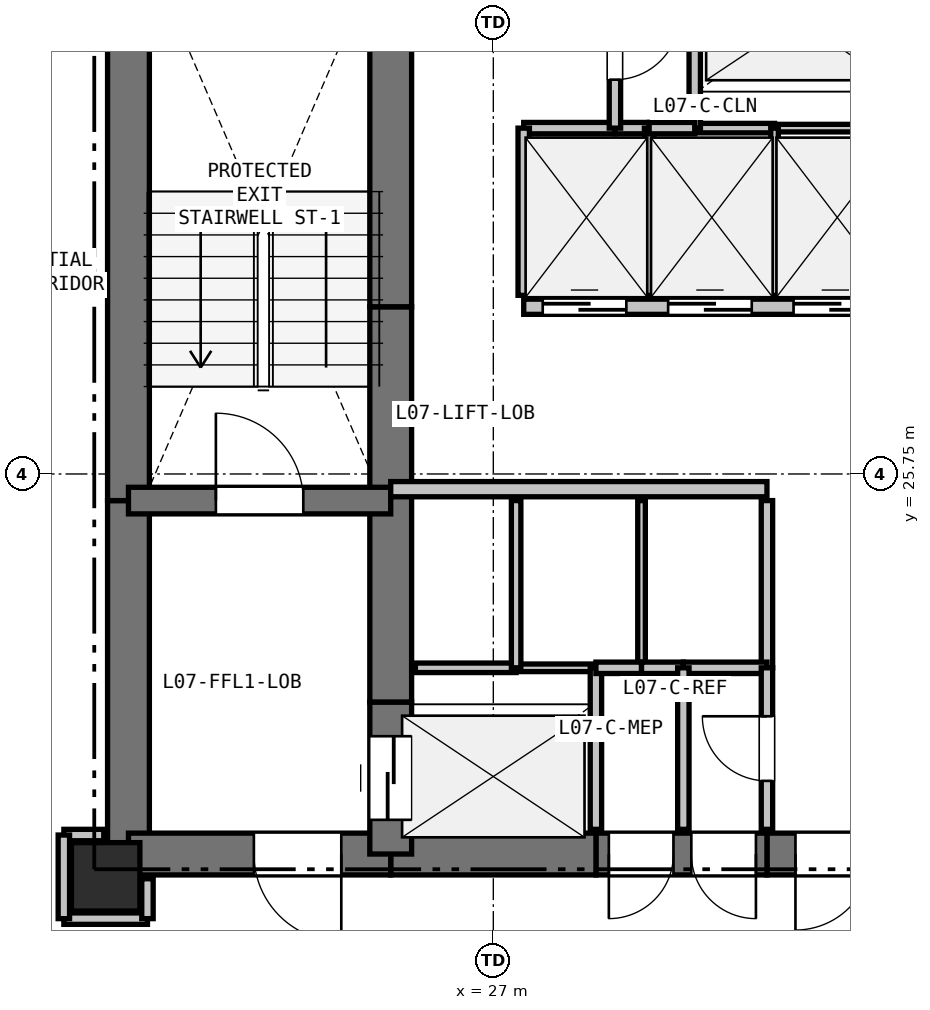
"""IFC4 building model, lengths in metres.
Left out: names, types, materials, properties, quantities, classifications, styles, units other than length and angle.
Written with IfcOpenShell. Run it as: python <this file> out.ifc"""

import sys

from ifc_helpers import new_model, si_unit, direction, frame, frame_2d, origin, origin_2d, place, context, subcontext, project, spatial, rectangle, extrude, element, fill, save


model = new_model("IFC4")
c1 = context("Model", 3, precision=1e-05, world=origin(), true_north=direction((0.0, 1.0)))
c2 = subcontext(c1, "Body", "Model", "MODEL_VIEW")
j1 = project(units=[si_unit("LENGTHUNIT", "METRE"), si_unit("PLANEANGLEUNIT", "RADIAN")], contexts=[c1])
p1 = place(None, origin())
s1 = spatial("IfcSite", under=j1, at=p1, CompositionType="ELEMENT")
p2 = place(p1, origin())
s2 = spatial("IfcBuilding", under=s1, at=p2, CompositionType="ELEMENT")
p3 = place(p2, frame((0.0, 0.0, 29.1)))
s3 = spatial("IfcBuildingStorey", under=s2, at=p3, CompositionType="ELEMENT", Elevation=29.1)
p4 = place(p3, frame((21.9, 20.45, 0.0), z_axis=(0.0, 0.0, 1.0), x_axis=(1.0, 0.0, 0.0)))
e1 = element("IfcColumn", 1, at=p4, inside=s3, PredefinedType="COLUMN", context=c2, shape_type="SweptSolid", body=[
    extrude(rectangle(XDim=0.9, YDim=0.9, at=origin_2d()), origin(), (0.0, 0.0, 1.0), 3.3),
])
p5 = place(p3, frame((22.2, 20.75, 0.0), z_axis=(0.0, 0.0, 1.0), x_axis=(0.0, 1.0, 0.0)))
e2 = element("IfcWall", 2, at=p5, inside=s3, PredefinedType="SHEAR", context=c2, shape_type="SweptSolid", body=[
    extrude(rectangle(XDim=4.65, YDim=0.55, at=frame_2d((2.325, 0.0))), origin(), (0.0, 0.0, 1.0), 3.04),
])
p6 = place(p3, frame((22.2, 25.4, 0.0), z_axis=(0.0, 0.0, 1.0), x_axis=(0.0, 1.0, 0.0)))
e3 = element("IfcWall", 3, at=p6, inside=s3, PredefinedType="SHEAR", context=c2, shape_type="SweptSolid", body=[
    extrude(rectangle(XDim=7.35, YDim=0.55, at=frame_2d((3.675, 0.0))), origin(), (0.0, 0.0, 1.0), 3.04),
])
p7 = place(p3, frame((32.35, 20.75, 0.0), z_axis=(0.0, 0.0, 1.0), x_axis=(-1.0, 0.0, 0.0)))
e4 = element("IfcWall", 4, at=p7, inside=s3, PredefinedType="SHEAR", context=c2, shape_type="SweptSolid", body=[
    extrude(rectangle(XDim=1.75, YDim=0.55, at=frame_2d((0.875, 0.0))), origin(), (0.0, 0.0, 1.0), 3.04),
])
p8 = place(p7, frame((0.375, 0.0, 0.0)))
e5 = element("IfcOpeningElement", 5, at=p8, cuts=e4, PredefinedType="OPENING", context=c2, shape_type="SweptSolid", body=[
    extrude(rectangle(XDim=1.0, YDim=2.15, at=frame_2d((0.5, 1.075))), frame((0.0, 0.285, 0.0), z_axis=(0.0, -1.0, 0.0), x_axis=(1.0, 0.0, 0.0)), (0.0, 0.0, 1.0), 0.57),
])
p9 = place(p3, frame((30.6, 20.75, 0.0), z_axis=(0.0, 0.0, 1.0), x_axis=(-1.0, 0.0, 0.0)))
e6 = element("IfcWall", 6, at=p9, inside=s3, PredefinedType="SHEAR", context=c2, shape_type="SweptSolid", body=[
    extrude(rectangle(XDim=2.25, YDim=0.55, at=frame_2d((1.125, 0.0))), origin(), (0.0, 0.0, 1.0), 3.04),
])
p10 = place(p9, frame((1.23, 0.0, 0.0)))
e7 = element("IfcOpeningElement", 7, at=p10, cuts=e6, PredefinedType="OPENING", context=c2, shape_type="SweptSolid", body=[
    extrude(rectangle(XDim=0.85, YDim=2.1, at=frame_2d((0.425, 1.05))), frame((0.0, 0.285, 0.0), z_axis=(0.0, -1.0, 0.0), x_axis=(1.0, 0.0, 0.0)), (0.0, 0.0, 1.0), 0.57),
])
p11 = place(p9, frame((0.145, 0.0, 0.0)))
e8 = element("IfcOpeningElement", 8, at=p11, cuts=e6, PredefinedType="OPENING", context=c2, shape_type="SweptSolid", body=[
    extrude(rectangle(XDim=0.85, YDim=2.1, at=frame_2d((0.425, 1.05))), frame((0.0, 0.285, 0.0), z_axis=(0.0, -1.0, 0.0), x_axis=(1.0, 0.0, 0.0)), (0.0, 0.0, 1.0), 0.57),
])
p12 = place(p3, frame((28.35, 20.75, 0.0), z_axis=(0.0, 0.0, 1.0), x_axis=(-1.0, 0.0, 0.0)))
e9 = element("IfcWall", 9, at=p12, inside=s3, PredefinedType="SHEAR", context=c2, shape_type="SweptSolid", body=[
    extrude(rectangle(XDim=2.7, YDim=0.55, at=frame_2d((1.35, 0.0))), origin(), (0.0, 0.0, 1.0), 3.04),
])
p13 = place(p3, frame((25.65, 20.75, 0.0), z_axis=(0.0, 0.0, 1.0), x_axis=(-1.0, 0.0, 0.0)))
e10 = element("IfcWall", 10, at=p13, inside=s3, PredefinedType="SHEAR", context=c2, shape_type="SweptSolid", body=[
    extrude(rectangle(XDim=3.45, YDim=0.55, at=frame_2d((1.725, 0.0))), origin(), (0.0, 0.0, 1.0), 3.04),
])
p14 = place(p13, frame((0.65, 0.0, 0.0)))
e11 = element("IfcOpeningElement", 11, at=p14, cuts=e10, PredefinedType="OPENING", context=c2, shape_type="SweptSolid", body=[
    extrude(rectangle(XDim=1.15, YDim=2.15, at=frame_2d((0.575, 1.075))), frame((0.0, 0.285, 0.0), z_axis=(0.0, -1.0, 0.0), x_axis=(1.0, 0.0, 0.0)), (0.0, 0.0, 1.0), 0.57),
])
p15 = place(p3, frame((25.65, 20.75, 0.0), z_axis=(0.0, 0.0, 1.0), x_axis=(0.0, 1.0, 0.0)))
e12 = element("IfcWall", 12, at=p15, inside=s3, PredefinedType="SHEAR", context=c2, shape_type="SweptSolid", body=[
    extrude(rectangle(XDim=2.0, YDim=0.55, at=frame_2d((1.0, 0.0))), origin(), (0.0, 0.0, 1.0), 3.04),
])
p16 = place(p15, frame((0.45, 0.0, 0.0)))
e13 = element("IfcOpeningElement", 13, at=p16, cuts=e12, PredefinedType="OPENING", context=c2, shape_type="SweptSolid", body=[
    extrude(rectangle(XDim=1.1, YDim=2.15, at=frame_2d((0.55, 1.075))), frame((0.0, 0.285, 0.0), z_axis=(0.0, -1.0, 0.0), x_axis=(1.0, 0.0, 0.0)), (0.0, 0.0, 1.0), 0.57),
])
p17 = place(p3, frame((25.65, 22.75, 0.0), z_axis=(0.0, 0.0, 1.0), x_axis=(0.0, 1.0, 0.0)))
e14 = element("IfcWall", 14, at=p17, inside=s3, PredefinedType="SHEAR", context=c2, shape_type="SweptSolid", body=[
    extrude(rectangle(XDim=2.8, YDim=0.55, at=frame_2d((1.4, 0.0))), origin(), (0.0, 0.0, 1.0), 3.04),
])
p18 = place(p3, frame((25.65, 25.55, 0.0), z_axis=(0.0, 0.0, 1.0), x_axis=(0.0, 1.0, 0.0)))
e15 = element("IfcWall", 15, at=p18, inside=s3, PredefinedType="SHEAR", context=c2, shape_type="SweptSolid", body=[
    extrude(rectangle(XDim=2.4, YDim=0.55, at=frame_2d((1.2, 0.0))), origin(), (0.0, 0.0, 1.0), 3.04),
])
p19 = place(p3, frame((25.65, 27.95, 0.0), z_axis=(0.0, 0.0, 1.0), x_axis=(0.0, 1.0, 0.0)))
e16 = element("IfcWall", 16, at=p19, inside=s3, PredefinedType="SHEAR", context=c2, shape_type="SweptSolid", body=[
    extrude(rectangle(XDim=4.8, YDim=0.55, at=frame_2d((2.4, 0.0))), origin(), (0.0, 0.0, 1.0), 3.04),
])
p20 = place(p3, frame((22.2, 25.4, 0.0), z_axis=(0.0, 0.0, 1.0), x_axis=(1.0, 0.0, 0.0)))
e17 = element("IfcWall", 17, at=p20, inside=s3, PredefinedType="SHEAR", context=c2, shape_type="SweptSolid", body=[
    extrude(rectangle(XDim=3.45, YDim=0.35, at=frame_2d((1.725, 0.0))), origin(), (0.0, 0.0, 1.0), 3.04),
])
p21 = place(p20, frame((1.15, 0.0, 0.0)))
e18 = element("IfcOpeningElement", 18, at=p21, cuts=e17, PredefinedType="OPENING", context=c2, shape_type="SweptSolid", body=[
    extrude(rectangle(XDim=1.15, YDim=2.15, at=frame_2d((0.575, 1.075))), frame((0.0, 0.185, 0.0), z_axis=(0.0, -1.0, 0.0), x_axis=(1.0, 0.0, 0.0)), (0.0, 0.0, 1.0), 0.37),
])
p22 = place(p3, frame((25.65, 25.55, 0.0), z_axis=(0.0, 0.0, 1.0), x_axis=(1.0, 0.0, 0.0)))
e19 = element("IfcWall", 19, at=p22, inside=s3, PredefinedType="PARTITIONING", context=c2, shape_type="SweptSolid", body=[
    extrude(rectangle(XDim=4.95, YDim=0.2, at=frame_2d((2.475, 0.0))), origin(), (0.0, 0.0, 1.0), 3.04),
])
p23 = place(p3, frame((27.4, 27.95, 0.0), z_axis=(0.0, 0.0, 1.0), x_axis=(1.0, 0.0, 0.0)))
e20 = element("IfcWall", 20, at=p23, inside=s3, PredefinedType="PARTITIONING", context=c2, shape_type="SweptSolid", body=[
    extrude(rectangle(XDim=4.95, YDim=0.2, at=frame_2d((2.475, 0.0))), origin(), (0.0, 0.0, 1.0), 3.04),
])
p24 = place(p23, frame((0.25, 0.0, 0.0)))
e21 = element("IfcOpeningElement", 21, at=p24, cuts=e20, PredefinedType="OPENING", context=c2, shape_type="SweptSolid", body=[
    extrude(rectangle(XDim=1.1, YDim=2.15, at=frame_2d((0.55, 1.075))), frame((0.0, 0.11, 0.0), z_axis=(0.0, -1.0, 0.0), x_axis=(1.0, 0.0, 0.0)), (0.0, 0.0, 1.0), 0.22),
])
p25 = place(p23, frame((1.9, 0.0, 0.0)))
e22 = element("IfcOpeningElement", 22, at=p25, cuts=e20, PredefinedType="OPENING", context=c2, shape_type="SweptSolid", body=[
    extrude(rectangle(XDim=1.1, YDim=2.15, at=frame_2d((0.55, 1.075))), frame((0.0, 0.11, 0.0), z_axis=(0.0, -1.0, 0.0), x_axis=(1.0, 0.0, 0.0)), (0.0, 0.0, 1.0), 0.22),
])
p26 = place(p23, frame((3.55, 0.0, 0.0)))
e23 = element("IfcOpeningElement", 23, at=p26, cuts=e20, PredefinedType="OPENING", context=c2, shape_type="SweptSolid", body=[
    extrude(rectangle(XDim=1.1, YDim=2.15, at=frame_2d((0.55, 1.075))), frame((0.0, 0.11, 0.0), z_axis=(0.0, -1.0, 0.0), x_axis=(1.0, 0.0, 0.0)), (0.0, 0.0, 1.0), 0.22),
])
p27 = place(p3, frame((25.975, 23.2, 0.0), z_axis=(0.0, 0.0, 1.0), x_axis=(1.0, 0.0, 0.0)))
e24 = element("IfcWall", 24, at=p27, inside=s3, PredefinedType="PARTITIONING", context=c2, shape_type="SweptSolid", body=[
    extrude(rectangle(XDim=1.325, YDim=0.125, at=frame_2d((0.663, 0.0))), origin(), (0.0, 0.0, 1.0), 3.04),
])
p28 = place(p3, frame((27.3, 23.2, 0.0), z_axis=(0.0, 0.0, 1.0), x_axis=(1.0, 0.0, 0.0)))
e25 = element("IfcWall", 25, at=p28, inside=s3, PredefinedType="PARTITIONING", context=c2, shape_type="SweptSolid", body=[
    extrude(rectangle(XDim=1.05, YDim=0.1, at=frame_2d((0.525, 0.0))), origin(), (0.0, 0.0, 1.0), 3.04),
])
p29 = place(p3, frame((28.35, 23.2, 0.0), z_axis=(0.0, 0.0, 1.0), x_axis=(0.0, -1.0, 0.0)))
e26 = element("IfcWall", 26, at=p29, inside=s3, PredefinedType="PARTITIONING", context=c2, shape_type="SweptSolid", body=[
    extrude(rectangle(XDim=2.125, YDim=0.15, at=frame_2d((1.062, 0.0))), origin(), (0.0, 0.0, 1.0), 3.04),
])
p30 = place(p3, frame((32.025, 30.3, 0.0), z_axis=(0.0, 0.0, 1.0), x_axis=(-1.0, 0.0, 0.0)))
e27 = element("IfcWall", 27, at=p30, inside=s3, PredefinedType="PARTITIONING", context=c2, shape_type="SweptSolid", body=[
    extrude(rectangle(XDim=1.325, YDim=0.1, at=frame_2d((0.663, 0.0))), origin(), (0.0, 0.0, 1.0), 3.04),
])
p31 = place(p3, frame((30.7, 30.3, 0.0), z_axis=(0.0, 0.0, 1.0), x_axis=(-1.0, 0.0, 0.0)))
e28 = element("IfcWall", 28, at=p31, inside=s3, PredefinedType="PARTITIONING", context=c2, shape_type="SweptSolid", body=[
    extrude(rectangle(XDim=1.05, YDim=0.125, at=frame_2d((0.525, 0.0))), origin(), (0.0, 0.0, 1.0), 3.04),
])
p32 = place(p3, frame((29.65, 30.3, 0.0), z_axis=(0.0, 0.0, 1.0), x_axis=(0.0, 1.0, 0.0)))
e29 = element("IfcWall", 29, at=p32, inside=s3, PredefinedType="PARTITIONING", context=c2, shape_type="SweptSolid", body=[
    extrude(rectangle(XDim=2.125, YDim=0.15, at=frame_2d((1.062, 0.0))), origin(), (0.0, 0.0, 1.0), 3.04),
])
p33 = place(p3, frame((27.3, 25.4, 0.0), z_axis=(0.0, 0.0, 1.0), x_axis=(0.0, -1.0, 0.0)))
e30 = element("IfcWall", 30, at=p33, inside=s3, PredefinedType="PARTITIONING", context=c2, shape_type="SweptSolid", body=[
    extrude(rectangle(XDim=2.2, YDim=0.125, at=frame_2d((1.1, 0.0))), origin(), (0.0, 0.0, 1.0), 3.04),
])
p34 = place(p3, frame((28.95, 25.4, 0.0), z_axis=(0.0, 0.0, 1.0), x_axis=(0.0, -1.0, 0.0)))
e31 = element("IfcWall", 31, at=p34, inside=s3, PredefinedType="PARTITIONING", context=c2, shape_type="SweptSolid", body=[
    extrude(rectangle(XDim=2.2, YDim=0.1, at=frame_2d((1.1, 0.0))), origin(), (0.0, 0.0, 1.0), 3.04),
])
p35 = place(p3, frame((28.95, 23.2, 0.0), z_axis=(0.0, 0.0, 1.0), x_axis=(-1.0, 0.0, 0.0)))
e32 = element("IfcWall", 32, at=p35, inside=s3, PredefinedType="PARTITIONING", context=c2, shape_type="SweptSolid", body=[
    extrude(rectangle(XDim=0.6, YDim=0.15, at=frame_2d((0.3, 0.0))), origin(), (0.0, 0.0, 1.0), 3.04),
])
p36 = place(p3, frame((30.6, 25.4, 0.0), z_axis=(0.0, 0.0, 1.0), x_axis=(0.0, -1.0, 0.0)))
e33 = element("IfcWall", 33, at=p36, inside=s3, PredefinedType="PARTITIONING", context=c2, shape_type="SweptSolid", body=[
    extrude(rectangle(XDim=2.2, YDim=0.15, at=frame_2d((1.1, 0.0))), origin(), (0.0, 0.0, 1.0), 3.04),
])
p37 = place(p3, frame((30.6, 23.2, 0.0), z_axis=(0.0, 0.0, 1.0), x_axis=(-1.0, 0.0, 0.0)))
e34 = element("IfcWall", 34, at=p37, inside=s3, PredefinedType="PARTITIONING", context=c2, shape_type="SweptSolid", body=[
    extrude(rectangle(XDim=1.1, YDim=0.15, at=frame_2d((0.55, 0.0))), origin(), (0.0, 0.0, 1.0), 3.04),
])
p38 = place(p3, frame((29.5, 23.2, 0.0), z_axis=(0.0, 0.0, 1.0), x_axis=(-1.0, 0.0, 0.0)))
e35 = element("IfcWall", 35, at=p38, inside=s3, PredefinedType="PARTITIONING", context=c2, shape_type="SweptSolid", body=[
    extrude(rectangle(XDim=0.55, YDim=0.15, at=frame_2d((0.275, 0.0))), origin(), (0.0, 0.0, 1.0), 3.04),
])
p39 = place(p3, frame((27.4, 30.3, 0.0), z_axis=(0.0, 0.0, 1.0), x_axis=(1.0, 0.0, 0.0)))
e36 = element("IfcWall", 36, at=p39, inside=s3, PredefinedType="PARTITIONING", context=c2, shape_type="SweptSolid", body=[
    extrude(rectangle(XDim=1.2, YDim=0.15, at=frame_2d((0.6, 0.0))), origin(), (0.0, 0.0, 1.0), 3.04),
])
p40 = place(p3, frame((28.6, 30.3, 0.0), z_axis=(0.0, 0.0, 1.0), x_axis=(1.0, 0.0, 0.0)))
e37 = element("IfcWall", 37, at=p40, inside=s3, PredefinedType="PARTITIONING", context=c2, shape_type="SweptSolid", body=[
    extrude(rectangle(XDim=0.45, YDim=0.15, at=frame_2d((0.225, 0.0))), origin(), (0.0, 0.0, 1.0), 3.04),
])
p41 = place(p3, frame((29.05, 30.3, 0.0), z_axis=(0.0, 0.0, 1.0), x_axis=(0.0, -1.0, 0.0)))
e38 = element("IfcWall", 38, at=p41, inside=s3, PredefinedType="PARTITIONING", context=c2, shape_type="SweptSolid", body=[
    extrude(rectangle(XDim=2.2, YDim=0.125, at=frame_2d((1.1, 0.0))), origin(), (0.0, 0.0, 1.0), 3.04),
])
p42 = place(p3, frame((27.4, 28.1, 0.0), z_axis=(0.0, 0.0, 1.0), x_axis=(0.0, 1.0, 0.0)))
e39 = element("IfcWall", 39, at=p42, inside=s3, PredefinedType="PARTITIONING", context=c2, shape_type="SweptSolid", body=[
    extrude(rectangle(XDim=2.2, YDim=0.15, at=frame_2d((1.1, 0.0))), origin(), (0.0, 0.0, 1.0), 3.04),
])
p43 = place(p3, frame((29.05, 30.3, 0.0), z_axis=(0.0, 0.0, 1.0), x_axis=(1.0, 0.0, 0.0)))
e40 = element("IfcWall", 40, at=p43, inside=s3, PredefinedType="PARTITIONING", context=c2, shape_type="SweptSolid", body=[
    extrude(rectangle(XDim=0.6, YDim=0.15, at=frame_2d((0.3, 0.0))), origin(), (0.0, 0.0, 1.0), 3.04),
])
p44 = place(p3, frame((30.7, 30.3, 0.0), z_axis=(0.0, 0.0, 1.0), x_axis=(0.0, -1.0, 0.0)))
e41 = element("IfcWall", 41, at=p44, inside=s3, PredefinedType="PARTITIONING", context=c2, shape_type="SweptSolid", body=[
    extrude(rectangle(XDim=2.2, YDim=0.1, at=frame_2d((1.1, 0.0))), origin(), (0.0, 0.0, 1.0), 3.04),
])
p45 = place(p3, frame((30.6, 21.075, 0.0), z_axis=(0.0, 0.0, 1.0), x_axis=(0.0, 1.0, 0.0)))
e42 = element("IfcWall", 42, at=p45, inside=s3, PredefinedType="PARTITIONING", context=c2, shape_type="SweptSolid", body=[
    extrude(rectangle(XDim=2.125, YDim=0.15, at=frame_2d((1.062, 0.0))), origin(), (0.0, 0.0, 1.0), 3.04),
])
p46 = place(p45, frame((0.637, 0.0, 0.0)))
e43 = element("IfcOpeningElement", 43, at=p46, cuts=e42, PredefinedType="OPENING", context=c2, shape_type="SweptSolid", body=[
    extrude(rectangle(XDim=0.85, YDim=2.1, at=frame_2d((0.425, 1.05))), frame((0.0, 0.085, 0.0), z_axis=(0.0, -1.0, 0.0), x_axis=(1.0, 0.0, 0.0)), (0.0, 0.0, 1.0), 0.17),
])
p47 = place(p3, frame((28.6, 32.425, 0.0), z_axis=(0.0, 0.0, 1.0), x_axis=(0.0, -1.0, 0.0)))
e44 = element("IfcWall", 44, at=p47, inside=s3, PredefinedType="PARTITIONING", context=c2, shape_type="SweptSolid", body=[
    extrude(rectangle(XDim=2.125, YDim=0.15, at=frame_2d((1.062, 0.0))), origin(), (0.0, 0.0, 1.0), 3.04),
])
p48 = place(p47, frame((0.637, 0.0, 0.0)))
e45 = element("IfcOpeningElement", 45, at=p48, cuts=e44, PredefinedType="OPENING", context=c2, shape_type="SweptSolid", body=[
    extrude(rectangle(XDim=0.85, YDim=2.1, at=frame_2d((0.425, 1.05))), frame((0.0, 0.085, 0.0), z_axis=(0.0, -1.0, 0.0), x_axis=(1.0, 0.0, 0.0)), (0.0, 0.0, 1.0), 0.17),
])
p49 = place(p3, frame((21.35, 19.9, 0.0), z_axis=(0.0, 0.0, 1.0), x_axis=(1.0, 0.0, 0.0)))
e46 = element("IfcWall", 46, at=p49, inside=s3, PredefinedType="PARTITIONING", context=c2, shape_type="SweptSolid", body=[
    extrude(rectangle(XDim=1.1, YDim=0.15, at=frame_2d((0.55, 0.0))), origin(), (0.0, 0.0, 1.0), 2.337),
])
p50 = place(p3, frame((22.45, 19.9, 0.0), z_axis=(0.0, 0.0, 1.0), x_axis=(0.0, 1.0, 0.0)))
e47 = element("IfcWall", 47, at=p50, inside=s3, PredefinedType="PARTITIONING", context=c2, shape_type="SweptSolid", body=[
    extrude(rectangle(XDim=0.525, YDim=0.15, at=frame_2d((0.263, 0.0))), origin(), (0.0, 0.0, 1.0), 2.337),
])
p51 = place(p3, frame((21.875, 21.0, 0.0), z_axis=(0.0, 0.0, 1.0), x_axis=(-1.0, 0.0, 0.0)))
e48 = element("IfcWall", 48, at=p51, inside=s3, PredefinedType="PARTITIONING", context=c2, shape_type="SweptSolid", body=[
    extrude(rectangle(XDim=0.525, YDim=0.15, at=frame_2d((0.262, 0.0))), origin(), (0.0, 0.0, 1.0), 2.488),
])
p52 = place(p3, frame((21.35, 21.0, 0.0), z_axis=(0.0, 0.0, 1.0), x_axis=(0.0, -1.0, 0.0)))
e49 = element("IfcWall", 49, at=p52, inside=s3, PredefinedType="PARTITIONING", context=c2, shape_type="SweptSolid", body=[
    extrude(rectangle(XDim=1.1, YDim=0.15, at=frame_2d((0.55, 0.0))), origin(), (0.0, 0.0, 1.0), 2.337),
])
p53 = place(p3, frame((29.5, 23.2, 0.0), z_axis=(0.0, 0.0, 1.0), x_axis=(0.0, -1.0, 0.0)))
e50 = element("IfcWall", 50, at=p53, inside=s3, PredefinedType="PARTITIONING", context=c2, shape_type="SweptSolid", body=[
    extrude(rectangle(XDim=2.125, YDim=0.15, at=frame_2d((1.062, 0.0))), origin(), (0.0, 0.0, 1.0), 3.04),
])
p54 = place(p24, origin())
e51 = element("IfcDoor", 51, at=p54, inside=s3, OperationType="SLIDING_TO_LEFT", PredefinedType="DOOR", context=c2, shape_type="SweptSolid", body=[
    extrude(rectangle(XDim=1.1, YDim=2.15, at=frame_2d((0.55, 1.075))), frame((0.0, 0.025, 0.0), z_axis=(0.0, -1.0, 0.0), x_axis=(1.0, 0.0, 0.0)), (0.0, 0.0, 1.0), 0.05),
])
fill(e21, e51)
p55 = place(p25, origin())
e52 = element("IfcDoor", 52, at=p55, inside=s3, OperationType="SLIDING_TO_LEFT", PredefinedType="DOOR", context=c2, shape_type="SweptSolid", body=[
    extrude(rectangle(XDim=1.1, YDim=2.15, at=frame_2d((0.55, 1.075))), frame((0.0, 0.025, 0.0), z_axis=(0.0, -1.0, 0.0), x_axis=(1.0, 0.0, 0.0)), (0.0, 0.0, 1.0), 0.05),
])
fill(e22, e52)
p56 = place(p26, origin())
e53 = element("IfcDoor", 53, at=p56, inside=s3, OperationType="SLIDING_TO_LEFT", PredefinedType="DOOR", context=c2, shape_type="SweptSolid", body=[
    extrude(rectangle(XDim=1.1, YDim=2.15, at=frame_2d((0.55, 1.075))), frame((0.0, 0.025, 0.0), z_axis=(0.0, -1.0, 0.0), x_axis=(1.0, 0.0, 0.0)), (0.0, 0.0, 1.0), 0.05),
])
fill(e23, e53)
p57 = place(p8, origin())
e54 = element("IfcDoor", 54, at=p57, inside=s3, OperationType="SINGLE_SWING_RIGHT", PredefinedType="DOOR", context=c2, shape_type="SweptSolid", body=[
    extrude(rectangle(XDim=1.0, YDim=2.15, at=frame_2d((0.5, 1.075))), frame((0.0, 0.025, 0.0), z_axis=(0.0, -1.0, 0.0), x_axis=(1.0, 0.0, 0.0)), (0.0, 0.0, 1.0), 0.05),
])
fill(e5, e54)
p58 = place(p16, origin())
e55 = element("IfcDoor", 55, at=p58, inside=s3, OperationType="SLIDING_TO_LEFT", PredefinedType="DOOR", context=c2, shape_type="SweptSolid", body=[
    extrude(rectangle(XDim=1.1, YDim=2.15, at=frame_2d((0.55, 1.075))), frame((0.0, 0.025, 0.0), z_axis=(0.0, -1.0, 0.0), x_axis=(1.0, 0.0, 0.0)), (0.0, 0.0, 1.0), 0.05),
])
fill(e13, e55)
p59 = place(p21, origin())
e56 = element("IfcDoor", 56, at=p59, inside=s3, OperationType="SINGLE_SWING_LEFT", PredefinedType="DOOR", context=c2, shape_type="SweptSolid", body=[
    extrude(rectangle(XDim=1.15, YDim=2.15, at=frame_2d((0.575, 1.075))), frame((0.0, 0.025, 0.0), z_axis=(0.0, -1.0, 0.0), x_axis=(1.0, 0.0, 0.0)), (0.0, 0.0, 1.0), 0.05),
])
fill(e18, e56)
p60 = place(p14, origin())
e57 = element("IfcDoor", 57, at=p60, inside=s3, OperationType="SINGLE_SWING_LEFT", PredefinedType="DOOR", context=c2, shape_type="SweptSolid", body=[
    extrude(rectangle(XDim=1.15, YDim=2.15, at=frame_2d((0.575, 1.075))), frame((0.0, 0.025, 0.0), z_axis=(0.0, -1.0, 0.0), x_axis=(1.0, 0.0, 0.0)), (0.0, 0.0, 1.0), 0.05),
])
fill(e11, e57)
p61 = place(p46, origin())
e58 = element("IfcDoor", 58, at=p61, inside=s3, OperationType="SINGLE_SWING_RIGHT", PredefinedType="DOOR", context=c2, shape_type="SweptSolid", body=[
    extrude(rectangle(XDim=0.85, YDim=2.1, at=frame_2d((0.425, 1.05))), frame((0.0, 0.025, 0.0), z_axis=(0.0, -1.0, 0.0), x_axis=(1.0, 0.0, 0.0)), (0.0, 0.0, 1.0), 0.05),
])
fill(e43, e58)
p62 = place(p48, origin())
e59 = element("IfcDoor", 59, at=p62, inside=s3, OperationType="SINGLE_SWING_LEFT", PredefinedType="DOOR", context=c2, shape_type="SweptSolid", body=[
    extrude(rectangle(XDim=0.85, YDim=2.1, at=frame_2d((0.425, 1.05))), frame((0.0, 0.025, 0.0), z_axis=(0.0, -1.0, 0.0), x_axis=(1.0, 0.0, 0.0)), (0.0, 0.0, 1.0), 0.05),
])
fill(e45, e59)
p63 = place(p10, origin())
e60 = element("IfcDoor", 60, at=p63, inside=s3, OperationType="SINGLE_SWING_RIGHT", PredefinedType="DOOR", context=c2, shape_type="SweptSolid", body=[
    extrude(rectangle(XDim=0.85, YDim=2.1, at=frame_2d((0.425, 1.05))), frame((0.0, 0.025, 0.0), z_axis=(0.0, -1.0, 0.0), x_axis=(1.0, 0.0, 0.0)), (0.0, 0.0, 1.0), 0.05),
])
fill(e7, e60)
p64 = place(p11, origin())
e61 = element("IfcDoor", 61, at=p64, inside=s3, OperationType="SINGLE_SWING_LEFT", PredefinedType="DOOR", context=c2, shape_type="SweptSolid", body=[
    extrude(rectangle(XDim=0.85, YDim=2.1, at=frame_2d((0.425, 1.05))), frame((0.0, 0.025, 0.0), z_axis=(0.0, -1.0, 0.0), x_axis=(1.0, 0.0, 0.0)), (0.0, 0.0, 1.0), 0.05),
])
fill(e8, e61)
save(model, sys.argv[1])
